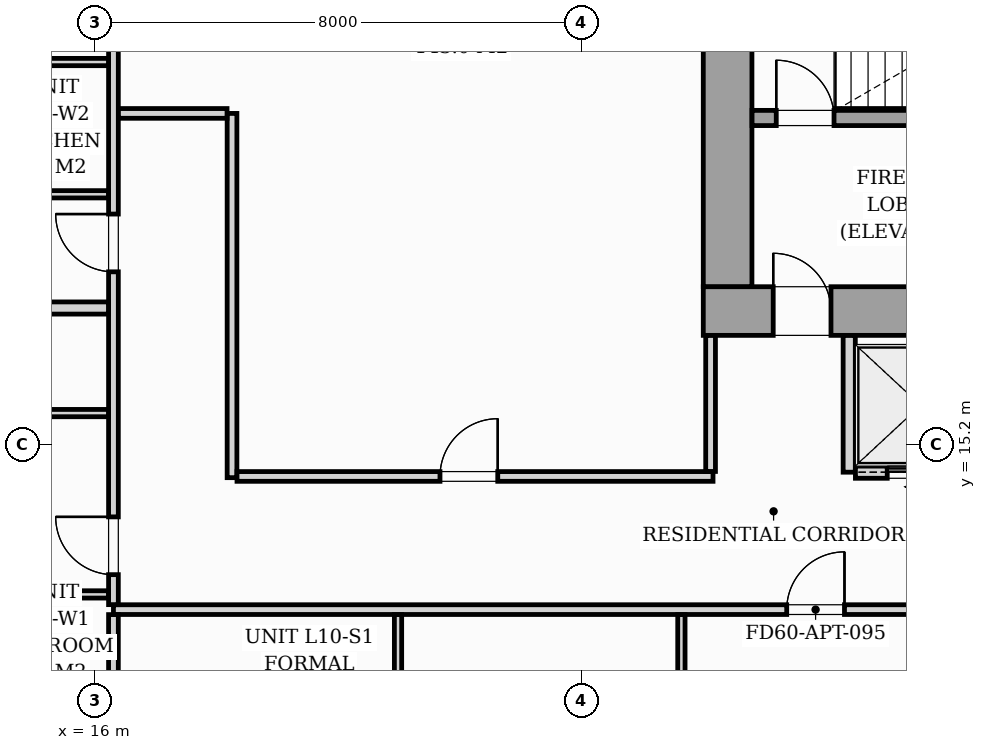
"""IFC4 building model, lengths in metres.
Left out: names, types, materials, properties, quantities, classifications, styles, units other than length and angle.
Written with IfcOpenShell. Run it as: python <this file> out.ifc"""

import sys

from ifc_helpers import new_model, si_unit, direction, frame, frame_2d, origin, origin_2d, place, context, subcontext, project, spatial, rectangle, i_section, extrude, source, transform, mapped, element, fill, save


model = new_model("IFC4")
c1 = context("Model", 3, precision=1e-05, world=origin(), true_north=direction((0.0, 1.0)))
c2 = subcontext(c1, "Body", "Model", "MODEL_VIEW")
j1 = project(units=[si_unit("LENGTHUNIT", "METRE"), si_unit("PLANEANGLEUNIT", "RADIAN")], contexts=[c1])
p1 = place(None, origin())
s1 = spatial("IfcSite", under=j1, at=p1, CompositionType="ELEMENT")
p2 = place(p1, origin())
s2 = spatial("IfcBuilding", under=s1, at=p2, CompositionType="ELEMENT")
p3 = place(p2, frame((0.0, 0.0, 39.0)))
s3 = spatial("IfcBuildingStorey", under=s2, at=p3, CompositionType="ELEMENT", Elevation=39.0)
m1 = source(origin(), c2, "Body", "SweptSolid", [
    extrude(i_section(OverallWidth=0.437, OverallDepth=0.514, WebThickness=0.061, FlangeThickness=0.097, FilletRadius=0.018, at=origin_2d()), origin(), (0.0, 0.0, 1.0), 3.196),
])
p4 = place(p3, frame((26.4, 17.4, 0.002), z_axis=(0.0, 0.0, 1.0), x_axis=(1.0, 0.0, 0.0)))
e1 = element("IfcColumn", 1, at=p4, inside=s3, PredefinedType="PILASTER", context=c2, shape_type="MappedRepresentation", body=[
    mapped(m1, transform((0.0, 0.0, 0.0), scale=1.0)),
])
p5 = place(p3, frame((26.0, 17.4, 0.0), z_axis=(0.0, 0.0, 1.0), x_axis=(1.0, 0.0, 0.0)))
e2 = element("IfcWall", 2, at=p5, inside=s3, PredefinedType="SHEAR", context=c2, shape_type="SweptSolid", body=[
    extrude(rectangle(XDim=20.0, YDim=0.8, at=frame_2d((10.0, 0.0))), origin(), (0.0, 0.0, 1.0), 3.2),
])
p6 = place(p5, frame((1.15, 0.0, 0.0)))
e3 = element("IfcOpeningElement", 3, at=p6, cuts=e2, PredefinedType="OPENING", context=c2, shape_type="SweptSolid", body=[
    extrude(rectangle(XDim=0.95, YDim=2.06, at=frame_2d((0.475, 1.03))), frame((0.0, 0.41, 0.0), z_axis=(0.0, -1.0, 0.0), x_axis=(1.0, 0.0, 0.0)), (0.0, 0.0, 1.0), 0.82),
])
p7 = place(p5, frame((9.58, 0.0, 0.0)))
e4 = element("IfcOpeningElement", 4, at=p7, cuts=e2, PredefinedType="OPENING", context=c2, shape_type="SweptSolid", body=[
    extrude(rectangle(XDim=0.85, YDim=2.0, at=frame_2d((0.425, 1.0))), frame((0.0, 0.41, 0.0), z_axis=(0.0, -1.0, 0.0), x_axis=(1.0, 0.0, 0.0)), (0.0, 0.0, 1.0), 0.82),
])
p8 = place(p5, frame((17.75, 0.0, 0.0)))
e5 = element("IfcOpeningElement", 5, at=p8, cuts=e2, PredefinedType="OPENING", context=c2, shape_type="SweptSolid", body=[
    extrude(rectangle(XDim=0.95, YDim=2.06, at=frame_2d((0.475, 1.03))), frame((0.0, 0.41, 0.0), z_axis=(0.0, -1.0, 0.0), x_axis=(1.0, 0.0, 0.0)), (0.0, 0.0, 1.0), 0.82),
])
p9 = place(p3, frame((26.4, 17.802, 0.0), z_axis=(0.0, 0.0, 1.0), x_axis=(0.0, 1.0, 0.0)))
e6 = element("IfcWall", 6, at=p9, inside=s3, PredefinedType="SHEAR", context=c2, shape_type="SweptSolid", body=[
    extrude(rectangle(XDim=5.796, YDim=0.8, at=frame_2d((2.898, 0.0))), origin(), (0.0, 0.0, 1.0), 3.2),
])
p10 = place(p3, frame((26.802, 20.575, 0.0), z_axis=(0.0, 0.0, 1.0), x_axis=(1.0, 0.0, 0.0)))
e7 = element("IfcWall", 7, at=p10, inside=s3, PredefinedType="SOLIDWALL", context=c2, shape_type="SweptSolid", body=[
    extrude(rectangle(XDim=8.148, YDim=0.25, at=frame_2d((4.074, 0.0))), origin(), (0.0, 0.0, 1.0), 3.2),
])
p11 = place(p10, frame((0.398, 0.0, 0.0)))
e8 = element("IfcOpeningElement", 8, at=p11, cuts=e7, PredefinedType="OPENING", context=c2, shape_type="SweptSolid", body=[
    extrude(rectangle(XDim=0.95, YDim=2.06, at=frame_2d((0.475, 1.03))), frame((0.0, 0.135, 0.0), z_axis=(0.0, -1.0, 0.0), x_axis=(1.0, 0.0, 0.0)), (0.0, 0.0, 1.0), 0.27),
])
p12 = place(p3, frame((28.4, 14.75, 0.0), z_axis=(0.0, 0.0, 1.0), x_axis=(0.0, 1.0, 0.0)))
e9 = element("IfcWall", 9, at=p12, inside=s3, PredefinedType="PARTITIONING", context=c2, shape_type="SweptSolid", body=[
    extrude(rectangle(XDim=2.248, YDim=0.2, at=frame_2d((1.124, 0.0))), origin(), (0.0, 0.0, 1.0), 2.94),
])
p13 = place(p3, frame((28.502, 14.75, 0.0), z_axis=(0.0, 0.0, 1.0), x_axis=(1.0, 0.0, 0.0)))
e10 = element("IfcWall", 10, at=p13, inside=s3, PredefinedType="PARTITIONING", context=c2, shape_type="SweptSolid", body=[
    extrude(rectangle(XDim=2.146, YDim=0.2, at=frame_2d((1.073, 0.0))), origin(), (0.0, 0.0, 1.0), 2.94),
])
p14 = place(p13, frame((0.523, 0.0, 0.0)))
e11 = element("IfcOpeningElement", 11, at=p14, cuts=e10, PredefinedType="OPENING", context=c2, shape_type="SweptSolid", body=[
    extrude(rectangle(XDim=1.05, YDim=2.08, at=frame_2d((0.525, 1.04))), frame((0.0, 0.11, 0.0), z_axis=(0.0, -1.0, 0.0), x_axis=(1.0, 0.0, 0.0)), (0.0, 0.0, 1.0), 0.22),
])
p15 = place(p3, frame((16.3, 12.49, 0.0), z_axis=(0.0, 0.0, 1.0), x_axis=(1.0, 0.0, 0.0)))
e12 = element("IfcWall", 12, at=p15, inside=s3, PredefinedType="PARTITIONING", context=c2, shape_type="SweptSolid", body=[
    extrude(rectangle(XDim=35.2, YDim=0.16, at=frame_2d((17.6, 0.0))), origin(), (0.0, 0.0, 1.0), 2.94),
])
p16 = place(p15, frame((11.072, 0.0, 0.0)))
e13 = element("IfcOpeningElement", 13, at=p16, cuts=e12, PredefinedType="OPENING", context=c2, shape_type="SweptSolid", body=[
    extrude(rectangle(XDim=0.95, YDim=2.06, at=frame_2d((0.475, 1.03))), frame((0.0, 0.09, 0.0), z_axis=(0.0, -1.0, 0.0), x_axis=(1.0, 0.0, 0.0)), (0.0, 0.0, 1.0), 0.18),
])
p17 = place(p15, frame((24.032, 0.0, 0.0)))
e14 = element("IfcOpeningElement", 14, at=p17, cuts=e12, PredefinedType="OPENING", context=c2, shape_type="SweptSolid", body=[
    extrude(rectangle(XDim=0.95, YDim=2.06, at=frame_2d((0.475, 1.03))), frame((0.0, 0.09, 0.0), z_axis=(0.0, -1.0, 0.0), x_axis=(1.0, 0.0, 0.0)), (0.0, 0.0, 1.0), 0.18),
])
p18 = place(p3, frame((16.3, 2.962, 0.0), z_axis=(0.0, 0.0, 1.0), x_axis=(0.0, 1.0, 0.0)))
e15 = element("IfcWall", 15, at=p18, inside=s3, PredefinedType="PARTITIONING", context=c2, shape_type="SweptSolid", body=[
    extrude(rectangle(XDim=9.446, YDim=0.16, at=frame_2d((4.723, 0.0))), origin(), (0.0, 0.0, 1.0), 2.94),
])
p19 = place(p3, frame((16.3, 12.572, 0.0), z_axis=(0.0, 0.0, 1.0), x_axis=(0.0, 1.0, 0.0)))
e16 = element("IfcWall", 16, at=p19, inside=s3, PredefinedType="PARTITIONING", context=c2, shape_type="SweptSolid", body=[
    extrude(rectangle(XDim=14.866, YDim=0.16, at=frame_2d((7.433, 0.0))), origin(), (0.0, 0.0, 1.0), 2.94),
])
p20 = place(p19, frame((0.493, 0.0, 0.0)))
e17 = element("IfcOpeningElement", 17, at=p20, cuts=e16, PredefinedType="OPENING", context=c2, shape_type="SweptSolid", body=[
    extrude(rectangle(XDim=0.95, YDim=2.06, at=frame_2d((0.475, 1.03))), frame((0.0, 0.09, 0.0), z_axis=(0.0, -1.0, 0.0), x_axis=(1.0, 0.0, 0.0)), (0.0, 0.0, 1.0), 0.18),
])
p21 = place(p19, frame((5.473, 0.0, 0.0)))
e18 = element("IfcOpeningElement", 18, at=p21, cuts=e16, PredefinedType="OPENING", context=c2, shape_type="SweptSolid", body=[
    extrude(rectangle(XDim=0.95, YDim=2.06, at=frame_2d((0.475, 1.03))), frame((0.0, 0.09, 0.0), z_axis=(0.0, -1.0, 0.0), x_axis=(1.0, 0.0, 0.0)), (0.0, 0.0, 1.0), 0.18),
])
p22 = place(p3, frame((20.98, 2.962, 0.0), z_axis=(0.0, 0.0, 1.0), x_axis=(0.0, 1.0, 0.0)))
e19 = element("IfcWall", 19, at=p22, inside=s3, PredefinedType="PARTITIONING", context=c2, shape_type="SweptSolid", body=[
    extrude(rectangle(XDim=9.446, YDim=0.12, at=frame_2d((4.723, 0.0))), origin(), (0.0, 0.0, 1.0), 2.94),
])
p23 = place(p22, frame((4.288, 0.0, 0.0)))
e20 = element("IfcOpeningElement", 20, at=p23, cuts=e19, PredefinedType="OPENING", context=c2, shape_type="SweptSolid", body=[
    extrude(rectangle(XDim=0.85, YDim=2.05, at=frame_2d((0.425, 1.025))), frame((0.0, 0.07, 0.0), z_axis=(0.0, -1.0, 0.0), x_axis=(1.0, 0.0, 0.0)), (0.0, 0.0, 1.0), 0.14),
])
p24 = place(p3, frame((25.64, 2.78, 0.0), z_axis=(0.0, 0.0, 1.0), x_axis=(0.0, 1.0, 0.0)))
e21 = element("IfcWall", 21, at=p24, inside=s3, PredefinedType="PARTITIONING", context=c2, shape_type="SweptSolid", body=[
    extrude(rectangle(XDim=9.628, YDim=0.12, at=frame_2d((4.814, 0.0))), origin(), (0.0, 0.0, 1.0), 2.94),
])
p25 = place(p24, frame((4.47, 0.0, 0.0)))
e22 = element("IfcOpeningElement", 22, at=p25, cuts=e21, PredefinedType="OPENING", context=c2, shape_type="SweptSolid", body=[
    extrude(rectangle(XDim=0.85, YDim=2.05, at=frame_2d((0.425, 1.025))), frame((0.0, 0.07, 0.0), z_axis=(0.0, -1.0, 0.0), x_axis=(1.0, 0.0, 0.0)), (0.0, 0.0, 1.0), 0.14),
])
p26 = place(p3, frame((5.88, 17.45, 0.0), z_axis=(0.0, 0.0, 1.0), x_axis=(1.0, 0.0, 0.0)))
e23 = element("IfcWall", 23, at=p26, inside=s3, PredefinedType="PARTITIONING", context=c2, shape_type="SweptSolid", body=[
    extrude(rectangle(XDim=10.338, YDim=0.2, at=frame_2d((5.169, 0.0))), origin(), (0.0, 0.0, 1.0), 2.94),
])
p27 = place(p3, frame((13.962, 12.74, 0.0), z_axis=(0.0, 0.0, 1.0), x_axis=(1.0, 0.0, 0.0)))
e24 = element("IfcWall", 24, at=p27, inside=s3, PredefinedType="PARTITIONING", context=c2, shape_type="SweptSolid", body=[
    extrude(rectangle(XDim=2.256, YDim=0.12, at=frame_2d((1.128, 0.0))), origin(), (0.0, 0.0, 1.0), 2.94),
])
p28 = place(p3, frame((5.88, 15.722, 0.0), z_axis=(0.0, 0.0, 1.0), x_axis=(1.0, 0.0, 0.0)))
e25 = element("IfcWall", 25, at=p28, inside=s3, PredefinedType="PARTITIONING", context=c2, shape_type="SweptSolid", body=[
    extrude(rectangle(XDim=10.338, YDim=0.12, at=frame_2d((5.169, 0.0))), origin(), (0.0, 0.0, 1.0), 2.045),
])
p29 = place(p28, frame((4.735, 0.0, 0.0)))
e26 = element("IfcOpeningElement", 26, at=p29, cuts=e25, PredefinedType="OPENING", context=c2, shape_type="SweptSolid", body=[
    extrude(rectangle(XDim=0.85, YDim=2.01, at=frame_2d((0.425, 1.005))), frame((0.0, 0.07, 0.0), z_axis=(0.0, -1.0, 0.0), x_axis=(1.0, 0.0, 0.0)), (0.0, 0.0, 1.0), 0.14),
])
for number, where, z_axis, x_axis in (
    (27, (13.962, 21.495, 0.0), (0.0, 0.0, 1.0), (1.0, 0.0, 0.0)),
    (28, (13.962, 19.32, 0.0), (0.0, 0.0, 1.0), (1.0, 0.0, 0.0)),
):
    element("IfcWall", number, at=place(p3, frame(where, z_axis=z_axis, x_axis=x_axis)), inside=s3, PredefinedType="PARTITIONING", context=c2, shape_type="SweptSolid", body=[
        extrude(rectangle(XDim=2.256, YDim=0.12, at=frame_2d((1.128, 0.0))), origin(), (0.0, 0.0, 1.0), 2.94),
    ])
p30 = place(p3, frame((18.25, 14.66, 0.0), z_axis=(0.0, 0.0, 1.0), x_axis=(0.0, 1.0, 0.0)))
e29 = element("IfcWall", 29, at=p30, inside=s3, PredefinedType="PARTITIONING", context=c2, shape_type="SweptSolid", body=[
    extrude(rectangle(XDim=5.99, YDim=0.16, at=frame_2d((2.995, 0.0))), origin(), (0.0, 0.0, 1.0), 2.94),
])
p31 = place(p3, frame((16.382, 20.65, 0.0), z_axis=(0.0, 0.0, 1.0), x_axis=(1.0, 0.0, 0.0)))
e30 = element("IfcWall", 30, at=p31, inside=s3, PredefinedType="PARTITIONING", context=c2, shape_type="SweptSolid", body=[
    extrude(rectangle(XDim=1.786, YDim=0.16, at=frame_2d((0.893, 0.0))), origin(), (0.0, 0.0, 1.0), 2.94),
])
p32 = place(p3, frame((18.332, 14.68, 0.0), z_axis=(0.0, 0.0, 1.0), x_axis=(1.0, 0.0, 0.0)))
e31 = element("IfcWall", 31, at=p32, inside=s3, PredefinedType="PARTITIONING", context=c2, shape_type="SweptSolid", body=[
    extrude(rectangle(XDim=7.828, YDim=0.16, at=frame_2d((3.914, 0.0))), origin(), (0.0, 0.0, 1.0), 2.94),
])
p33 = place(p32, frame((3.338, 0.0, 0.0)))
e32 = element("IfcOpeningElement", 32, at=p33, cuts=e31, PredefinedType="OPENING", context=c2, shape_type="SweptSolid", body=[
    extrude(rectangle(XDim=0.95, YDim=2.06, at=frame_2d((0.475, 1.03))), frame((0.0, 0.09, 0.0), z_axis=(0.0, -1.0, 0.0), x_axis=(1.0, 0.0, 0.0)), (0.0, 0.0, 1.0), 0.18),
])
p34 = place(p3, frame((26.12, 14.762, 0.0), z_axis=(0.0, 0.0, 1.0), x_axis=(0.0, 1.0, 0.0)))
e33 = element("IfcWall", 33, at=p34, inside=s3, PredefinedType="PARTITIONING", context=c2, shape_type="SweptSolid", body=[
    extrude(rectangle(XDim=2.236, YDim=0.16, at=frame_2d((1.118, 0.0))), origin(), (0.0, 0.0, 1.0), 2.94),
])
m2 = source(origin(), c2, "Body", "SweptSolid", [
    extrude(rectangle(XDim=0.95, YDim=2.06, at=frame_2d((0.475, 1.03))), frame((0.0, 0.025, 0.0), z_axis=(0.0, -1.0, 0.0), x_axis=(1.0, 0.0, 0.0)), (0.0, 0.0, 1.0), 0.05),
])
p35 = place(p6, origin())
e34 = element("IfcDoor", 34, at=p35, inside=s3, OperationType="SINGLE_SWING_LEFT", PredefinedType="DOOR", context=c2, shape_type="MappedRepresentation", body=[
    mapped(m2, transform((0.0, 0.0, 0.0), scale=1.0)),
])
fill(e3, e34)
p36 = place(p11, origin())
e35 = element("IfcDoor", 35, at=p36, inside=s3, OperationType="SINGLE_SWING_LEFT", PredefinedType="DOOR", context=c2, shape_type="MappedRepresentation", body=[
    mapped(m2, transform((0.0, 0.0, 0.0), scale=1.0)),
])
fill(e8, e35)
m3 = source(origin(), c2, "Body", "SweptSolid", [
    extrude(rectangle(XDim=1.05, YDim=2.08, at=frame_2d((0.525, 1.04))), frame((0.0, 0.025, 0.0), z_axis=(0.0, -1.0, 0.0), x_axis=(1.0, 0.0, 0.0)), (0.0, 0.0, 1.0), 0.05),
])
p37 = place(p14, origin())
e36 = element("IfcDoor", 36, at=p37, inside=s3, OperationType="SLIDING_TO_LEFT", PredefinedType="DOOR", context=c2, shape_type="MappedRepresentation", body=[
    mapped(m3, transform((0.0, 0.0, 0.0), scale=1.0)),
])
fill(e11, e36)
m4 = source(origin(), c2, "Body", "SweptSolid", [
    extrude(rectangle(XDim=0.95, YDim=2.06, at=frame_2d((0.475, 1.03))), frame((0.0, 0.025, 0.0), z_axis=(0.0, -1.0, 0.0), x_axis=(1.0, 0.0, 0.0)), (0.0, 0.0, 1.0), 0.05),
])
p38 = place(p16, origin())
e37 = element("IfcDoor", 37, at=p38, inside=s3, OperationType="SINGLE_SWING_RIGHT", PredefinedType="DOOR", context=c2, shape_type="MappedRepresentation", body=[
    mapped(m4, transform((0.0, 0.0, 0.0), scale=1.0)),
])
fill(e13, e37)
p39 = place(p20, origin())
e38 = element("IfcDoor", 38, at=p39, inside=s3, OperationType="SINGLE_SWING_RIGHT", PredefinedType="DOOR", context=c2, shape_type="MappedRepresentation", body=[
    mapped(m4, transform((0.0, 0.0, 0.0), scale=1.0)),
])
fill(e17, e38)
p40 = place(p21, origin())
e39 = element("IfcDoor", 39, at=p40, inside=s3, OperationType="SINGLE_SWING_RIGHT", PredefinedType="DOOR", context=c2, shape_type="MappedRepresentation", body=[
    mapped(m4, transform((0.0, 0.0, 0.0), scale=1.0)),
])
fill(e18, e39)
p41 = place(p33, origin())
e40 = element("IfcDoor", 40, at=p41, inside=s3, OperationType="SINGLE_SWING_RIGHT", PredefinedType="DOOR", context=c2, shape_type="MappedRepresentation", body=[
    mapped(m4, transform((0.0, 0.0, 0.0), scale=1.0)),
])
fill(e32, e40)
save(model, sys.argv[1])
